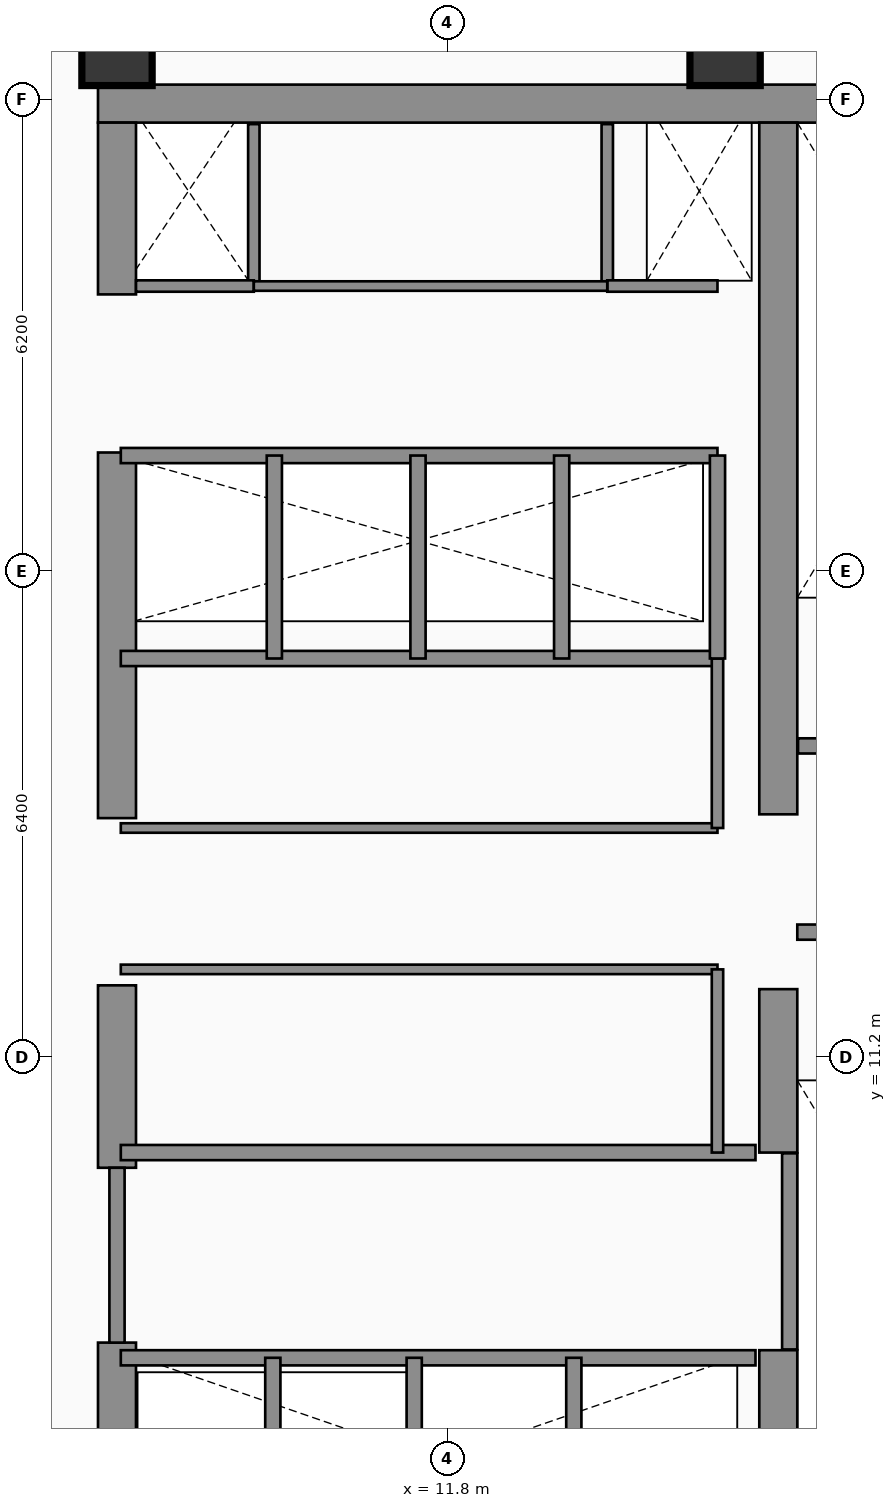
"""IFC4 building model, lengths in metres.
Left out: names, types, materials, properties, quantities, classifications, styles, units other than length and angle.
Written with IfcOpenShell. Run it as: python <this file> out.ifc"""

import sys

from ifc_helpers import new_model, si_unit, direction, frame, frame_2d, origin, origin_2d, place, context, subcontext, project, spatial, rectangle, extrude, element, fill, save


model = new_model("IFC4")
c1 = context("Model", 3, precision=1e-05, world=origin(), true_north=direction((0.0, 1.0)))
c2 = subcontext(c1, "Body", "Model", "MODEL_VIEW")
j1 = project(units=[si_unit("LENGTHUNIT", "METRE"), si_unit("PLANEANGLEUNIT", "RADIAN")], contexts=[c1])
p1 = place(None, origin())
s1 = spatial("IfcSite", under=j1, at=p1, CompositionType="ELEMENT")
p2 = place(p1, origin())
s2 = spatial("IfcBuilding", under=s1, at=p2, CompositionType="ELEMENT")
p3 = place(p2, frame((0.0, 0.0, 344.2)))
s3 = spatial("IfcBuildingStorey", under=s2, at=p3, CompositionType="ELEMENT", Elevation=344.2)
p4 = place(p3, frame((7.2, 23.75, 0.0), z_axis=(0.0, 0.0, 1.0), x_axis=(1.0, 0.0, 0.0)))
e1 = element("IfcWall", 1, at=p4, inside=s3, PredefinedType="SHEAR", context=c2, shape_type="SweptSolid", body=[
    extrude(rectangle(XDim=13.85, YDim=0.5, at=frame_2d((6.925, 0.0))), origin(), (0.0, 0.0, 1.0), 3.66),
])
p5 = place(p3, frame((7.45, 4.65, 0.0), z_axis=(0.0, 0.0, 1.0), x_axis=(0.0, 1.0, 0.0)))
e2 = element("IfcWall", 2, at=p5, inside=s3, PredefinedType="SHEAR", context=c2, shape_type="SweptSolid", body=[
    extrude(rectangle(XDim=2.8, YDim=0.5, at=frame_2d((1.4, 0.0))), origin(), (0.0, 0.0, 1.0), 3.66),
])
p6 = place(p3, frame((7.45, 9.75, 0.0), z_axis=(0.0, 0.0, 1.0), x_axis=(0.0, 1.0, 0.0)))
e3 = element("IfcWall", 3, at=p6, inside=s3, PredefinedType="SHEAR", context=c2, shape_type="SweptSolid", body=[
    extrude(rectangle(XDim=2.4, YDim=0.5, at=frame_2d((1.2, 0.0))), origin(), (0.0, 0.0, 1.0), 3.66),
])
p7 = place(p3, frame((7.45, 14.35, 0.0), z_axis=(0.0, 0.0, 1.0), x_axis=(0.0, 1.0, 0.0)))
e4 = element("IfcWall", 4, at=p7, inside=s3, PredefinedType="SHEAR", context=c2, shape_type="SweptSolid", body=[
    extrude(rectangle(XDim=4.81, YDim=0.5, at=frame_2d((2.405, 0.0))), origin(), (0.0, 0.0, 1.0), 3.66),
])
p8 = place(p3, frame((7.45, 21.24, 0.0), z_axis=(0.0, 0.0, 1.0), x_axis=(0.0, 1.0, 0.0)))
e5 = element("IfcWall", 5, at=p8, inside=s3, PredefinedType="SHEAR", context=c2, shape_type="SweptSolid", body=[
    extrude(rectangle(XDim=2.26, YDim=0.5, at=frame_2d((1.13, 0.0))), origin(), (0.0, 0.0, 1.0), 3.66),
])
p9 = place(p3, frame((16.15, 4.65, 0.0), z_axis=(0.0, 0.0, 1.0), x_axis=(0.0, 1.0, 0.0)))
e6 = element("IfcWall", 6, at=p9, inside=s3, PredefinedType="SHEAR", context=c2, shape_type="SweptSolid", body=[
    extrude(rectangle(XDim=2.7, YDim=0.5, at=frame_2d((1.35, 0.0))), origin(), (0.0, 0.0, 1.0), 3.66),
])
p10 = place(p3, frame((16.15, 9.95, 0.0), z_axis=(0.0, 0.0, 1.0), x_axis=(0.0, 1.0, 0.0)))
e7 = element("IfcWall", 7, at=p10, inside=s3, PredefinedType="SHEAR", context=c2, shape_type="SweptSolid", body=[
    extrude(rectangle(XDim=2.15, YDim=0.5, at=frame_2d((1.075, 0.0))), origin(), (0.0, 0.0, 1.0), 3.66),
])
p11 = place(p3, frame((16.15, 14.4, 0.0), z_axis=(0.0, 0.0, 1.0), x_axis=(0.0, 1.0, 0.0)))
e8 = element("IfcWall", 8, at=p11, inside=s3, PredefinedType="SHEAR", context=c2, shape_type="SweptSolid", body=[
    extrude(rectangle(XDim=9.1, YDim=0.5, at=frame_2d((4.55, 0.0))), origin(), (0.0, 0.0, 1.0), 3.66),
])
for number, where, z_axis, x_axis in (
    (9, (7.45, 24.45, 0.0), (0.0, 0.0, 1.0), (1.0, 0.0, 0.0)),
    (10, (15.45, 24.45, 0.0), (0.0, 0.0, 1.0), (1.0, 0.0, 0.0)),
):
    element("IfcColumn", number, at=place(p3, frame(where, z_axis=z_axis, x_axis=x_axis)), inside=s3, PredefinedType="COLUMN", context=c2, shape_type="SweptSolid", body=[
        extrude(rectangle(XDim=0.9, YDim=0.9, at=origin_2d()), origin(), (0.0, 0.0, 1.0), 3.66),
    ])
p12 = place(p3, frame((16.3, 7.36, 0.0), z_axis=(0.0, 0.0, 1.0), x_axis=(0.0, 1.0, 0.0)))
e11 = element("IfcWall", 11, at=p12, inside=s3, PredefinedType="SHEAR", context=c2, shape_type="SweptSolid", body=[
    extrude(rectangle(XDim=2.58, YDim=0.2, at=frame_2d((1.29, 0.0))), origin(), (0.0, 0.0, 1.0), 3.66),
])
p13 = place(p3, frame((16.4, 12.85, 0.0), z_axis=(0.0, 0.0, 1.0), x_axis=(1.0, 0.0, 0.0)))
e12 = element("IfcWall", 12, at=p13, inside=s3, PredefinedType="PARTITIONING", context=c2, shape_type="SweptSolid", body=[
    extrude(rectangle(XDim=3.96, YDim=0.2, at=frame_2d((1.98, 0.0))), origin(), (0.0, 0.0, 1.0), 3.66),
])
p14 = place(p13, frame((1.304, 0.0, 0.0)))
e13 = element("IfcOpeningElement", 13, at=p14, cuts=e12, PredefinedType="OPENING", context=c2, shape_type="SweptSolid", body=[
    extrude(rectangle(XDim=1.1, YDim=2.2, at=frame_2d((0.55, 1.1))), frame((0.0, 0.11, 0.0), z_axis=(0.0, -1.0, 0.0), x_axis=(1.0, 0.0, 0.0)), (0.0, 0.0, 1.0), 0.22),
])
p15 = place(p3, frame((16.41, 15.3, 0.0), z_axis=(0.0, 0.0, 1.0), x_axis=(1.0, 0.0, 0.0)))
e14 = element("IfcWall", 14, at=p15, inside=s3, PredefinedType="PARTITIONING", context=c2, shape_type="SweptSolid", body=[
    extrude(rectangle(XDim=3.95, YDim=0.2, at=frame_2d((1.975, 0.0))), origin(), (0.0, 0.0, 1.0), 3.66),
])
p16 = place(p15, frame((1.294, 0.0, 0.0)))
e15 = element("IfcOpeningElement", 15, at=p16, cuts=e14, PredefinedType="OPENING", context=c2, shape_type="SweptSolid", body=[
    extrude(rectangle(XDim=1.1, YDim=2.2, at=frame_2d((0.55, 1.1))), frame((0.0, 0.11, 0.0), z_axis=(0.0, -1.0, 0.0), x_axis=(1.0, 0.0, 0.0)), (0.0, 0.0, 1.0), 0.22),
])
p17 = place(p3, frame((7.5, 7.25, 0.0), z_axis=(0.0, 0.0, 1.0), x_axis=(1.0, 0.0, 0.0)))
e16 = element("IfcWall", 16, at=p17, inside=s3, PredefinedType="PARTITIONING", context=c2, shape_type="SweptSolid", body=[
    extrude(rectangle(XDim=8.35, YDim=0.2, at=frame_2d((4.175, 0.0))), origin(), (0.0, 0.0, 1.0), 3.66),
])
p18 = place(p17, frame((0.53, 0.0, 0.0)))
e17 = element("IfcOpeningElement", 17, at=p18, cuts=e16, PredefinedType="OPENING", context=c2, shape_type="SweptSolid", body=[
    extrude(rectangle(XDim=1.1, YDim=2.2, at=frame_2d((0.55, 1.1))), frame((0.0, 0.11, 0.0), z_axis=(0.0, -1.0, 0.0), x_axis=(1.0, 0.0, 0.0)), (0.0, 0.0, 1.0), 0.22),
])
p19 = place(p17, frame((2.37, 0.0, 0.0)))
e18 = element("IfcOpeningElement", 18, at=p19, cuts=e16, PredefinedType="OPENING", context=c2, shape_type="SweptSolid", body=[
    extrude(rectangle(XDim=1.1, YDim=2.2, at=frame_2d((0.55, 1.1))), frame((0.0, 0.11, 0.0), z_axis=(0.0, -1.0, 0.0), x_axis=(1.0, 0.0, 0.0)), (0.0, 0.0, 1.0), 0.22),
])
p20 = place(p17, frame((4.33, 0.0, 0.0)))
e19 = element("IfcOpeningElement", 19, at=p20, cuts=e16, PredefinedType="OPENING", context=c2, shape_type="SweptSolid", body=[
    extrude(rectangle(XDim=1.1, YDim=2.2, at=frame_2d((0.55, 1.1))), frame((0.0, 0.11, 0.0), z_axis=(0.0, -1.0, 0.0), x_axis=(1.0, 0.0, 0.0)), (0.0, 0.0, 1.0), 0.22),
])
p21 = place(p17, frame((6.5, 0.0, 0.0)))
e20 = element("IfcOpeningElement", 20, at=p21, cuts=e16, PredefinedType="OPENING", context=c2, shape_type="SweptSolid", body=[
    extrude(rectangle(XDim=1.1, YDim=2.2, at=frame_2d((0.55, 1.1))), frame((0.0, 0.11, 0.0), z_axis=(0.0, -1.0, 0.0), x_axis=(1.0, 0.0, 0.0)), (0.0, 0.0, 1.0), 0.22),
])
p22 = place(p3, frame((7.5, 9.95, 0.0), z_axis=(0.0, 0.0, 1.0), x_axis=(1.0, 0.0, 0.0)))
e21 = element("IfcWall", 21, at=p22, inside=s3, PredefinedType="PARTITIONING", context=c2, shape_type="SweptSolid", body=[
    extrude(rectangle(XDim=8.35, YDim=0.2, at=frame_2d((4.175, 0.0))), origin(), (0.0, 0.0, 1.0), 3.66),
])
for number, where, z_axis, x_axis in (
    (22, (9.5, 4.45, 0.0), (0.0, 0.0, 1.0), (0.0, 1.0, 0.0)),
    (23, (11.36, 4.45, 0.0), (0.0, 0.0, 1.0), (0.0, 1.0, 0.0)),
    (24, (13.46, 4.45, 0.0), (0.0, 0.0, 1.0), (0.0, 1.0, 0.0)),
):
    element("IfcWall", number, at=place(p3, frame(where, z_axis=z_axis, x_axis=x_axis)), inside=s3, PredefinedType="PARTITIONING", context=c2, shape_type="SweptSolid", body=[
        extrude(rectangle(XDim=2.8, YDim=0.2, at=frame_2d((1.4, 0.0))), origin(), (0.0, 0.0, 1.0), 3.66),
    ])
p23 = place(p3, frame((7.45, 7.45, 0.0), z_axis=(0.0, 0.0, 1.0), x_axis=(0.0, 1.0, 0.0)))
e25 = element("IfcWall", 25, at=p23, inside=s3, PredefinedType="PARTITIONING", context=c2, shape_type="SweptSolid", body=[
    extrude(rectangle(XDim=2.3, YDim=0.2, at=frame_2d((1.15, 0.0))), origin(), (0.0, 0.0, 1.0), 2.64),
])
p24 = place(p23, frame((0.633, 0.0, 0.0)))
e26 = element("IfcOpeningElement", 26, at=p24, cuts=e25, PredefinedType="OPENING", context=c2, shape_type="SweptSolid", body=[
    extrude(rectangle(XDim=1.2, YDim=2.25, at=frame_2d((0.6, 1.125))), frame((0.0, 0.11, 0.0), z_axis=(0.0, -1.0, 0.0), x_axis=(1.0, 0.0, 0.0)), (0.0, 0.0, 1.0), 0.22),
])
p25 = place(p3, frame((7.5, 16.45, 0.0), z_axis=(0.0, 0.0, 1.0), x_axis=(1.0, 0.0, 0.0)))
e27 = element("IfcWall", 27, at=p25, inside=s3, PredefinedType="PARTITIONING", context=c2, shape_type="SweptSolid", body=[
    extrude(rectangle(XDim=7.85, YDim=0.2, at=frame_2d((3.925, 0.0))), origin(), (0.0, 0.0, 1.0), 3.66),
])
p26 = place(p3, frame((7.5, 12.36, 0.0), z_axis=(0.0, 0.0, 1.0), x_axis=(1.0, 0.0, 0.0)))
e28 = element("IfcWall", 28, at=p26, inside=s3, PredefinedType="PARTITIONING", context=c2, shape_type="SweptSolid", body=[
    extrude(rectangle(XDim=7.85, YDim=0.125, at=frame_2d((3.925, 0.0))), origin(), (0.0, 0.0, 1.0), 3.66),
])
p27 = place(p26, frame((3.775, 0.0, 0.0)))
e29 = element("IfcOpeningElement", 29, at=p27, cuts=e28, PredefinedType="OPENING", context=c2, shape_type="SweptSolid", body=[
    extrude(rectangle(XDim=0.95, YDim=2.15, at=frame_2d((0.475, 1.075))), frame((0.0, 0.073, 0.0), z_axis=(0.0, -1.0, 0.0), x_axis=(1.0, 0.0, 0.0)), (0.0, 0.0, 1.0), 0.145),
])
p28 = place(p3, frame((7.5, 14.22, 0.0), z_axis=(0.0, 0.0, 1.0), x_axis=(1.0, 0.0, 0.0)))
e30 = element("IfcWall", 30, at=p28, inside=s3, PredefinedType="PARTITIONING", context=c2, shape_type="SweptSolid", body=[
    extrude(rectangle(XDim=7.85, YDim=0.125, at=frame_2d((3.925, 0.0))), origin(), (0.0, 0.0, 1.0), 3.66),
])
p29 = place(p28, frame((3.775, 0.0, 0.0)))
e31 = element("IfcOpeningElement", 31, at=p29, cuts=e30, PredefinedType="OPENING", context=c2, shape_type="SweptSolid", body=[
    extrude(rectangle(XDim=0.95, YDim=2.15, at=frame_2d((0.475, 1.075))), frame((0.0, 0.073, 0.0), z_axis=(0.0, -1.0, 0.0), x_axis=(1.0, 0.0, 0.0)), (0.0, 0.0, 1.0), 0.145),
])
p30 = place(p3, frame((15.35, 9.95, 0.0), z_axis=(0.0, 0.0, 1.0), x_axis=(0.0, 1.0, 0.0)))
e32 = element("IfcWall", 32, at=p30, inside=s3, PredefinedType="PARTITIONING", context=c2, shape_type="SweptSolid", body=[
    extrude(rectangle(XDim=2.41, YDim=0.15, at=frame_2d((1.205, 0.0))), origin(), (0.0, 0.0, 1.0), 3.66),
])
p31 = place(p3, frame((15.35, 14.22, 0.0), z_axis=(0.0, 0.0, 1.0), x_axis=(0.0, 1.0, 0.0)))
e33 = element("IfcWall", 33, at=p31, inside=s3, PredefinedType="PARTITIONING", context=c2, shape_type="SweptSolid", body=[
    extrude(rectangle(XDim=2.23, YDim=0.15, at=frame_2d((1.115, 0.0))), origin(), (0.0, 0.0, 1.0), 3.66),
])
p32 = place(p3, frame((7.5, 19.12, 0.0), z_axis=(0.0, 0.0, 1.0), x_axis=(1.0, 0.0, 0.0)))
e34 = element("IfcWall", 34, at=p32, inside=s3, PredefinedType="PARTITIONING", context=c2, shape_type="SweptSolid", body=[
    extrude(rectangle(XDim=7.85, YDim=0.2, at=frame_2d((3.925, 0.0))), origin(), (0.0, 0.0, 1.0), 3.66),
])
p33 = place(p32, frame((0.53, 0.0, 0.0)))
e35 = element("IfcOpeningElement", 35, at=p33, cuts=e34, PredefinedType="OPENING", context=c2, shape_type="SweptSolid", body=[
    extrude(rectangle(XDim=1.1, YDim=2.2, at=frame_2d((0.55, 1.1))), frame((0.0, 0.11, 0.0), z_axis=(0.0, -1.0, 0.0), x_axis=(1.0, 0.0, 0.0)), (0.0, 0.0, 1.0), 0.22),
])
p34 = place(p32, frame((2.42, 0.0, 0.0)))
e36 = element("IfcOpeningElement", 36, at=p34, cuts=e34, PredefinedType="OPENING", context=c2, shape_type="SweptSolid", body=[
    extrude(rectangle(XDim=1.1, YDim=2.2, at=frame_2d((0.55, 1.1))), frame((0.0, 0.11, 0.0), z_axis=(0.0, -1.0, 0.0), x_axis=(1.0, 0.0, 0.0)), (0.0, 0.0, 1.0), 0.22),
])
p35 = place(p32, frame((4.31, 0.0, 0.0)))
e37 = element("IfcOpeningElement", 37, at=p35, cuts=e34, PredefinedType="OPENING", context=c2, shape_type="SweptSolid", body=[
    extrude(rectangle(XDim=1.1, YDim=2.2, at=frame_2d((0.55, 1.1))), frame((0.0, 0.11, 0.0), z_axis=(0.0, -1.0, 0.0), x_axis=(1.0, 0.0, 0.0)), (0.0, 0.0, 1.0), 0.22),
])
p36 = place(p32, frame((6.2, 0.0, 0.0)))
e38 = element("IfcOpeningElement", 38, at=p36, cuts=e34, PredefinedType="OPENING", context=c2, shape_type="SweptSolid", body=[
    extrude(rectangle(XDim=1.1, YDim=2.2, at=frame_2d((0.55, 1.1))), frame((0.0, 0.11, 0.0), z_axis=(0.0, -1.0, 0.0), x_axis=(1.0, 0.0, 0.0)), (0.0, 0.0, 1.0), 0.22),
])
for number, where, z_axis, x_axis in (
    (39, (15.35, 16.45, 0.0), (0.0, 0.0, 1.0), (0.0, 1.0, 0.0)),
    (40, (9.52, 16.45, 0.0), (0.0, 0.0, 1.0), (0.0, 1.0, 0.0)),
    (41, (11.41, 16.45, 0.0), (0.0, 0.0, 1.0), (0.0, 1.0, 0.0)),
    (42, (13.3, 16.45, 0.0), (0.0, 0.0, 1.0), (0.0, 1.0, 0.0)),
):
    element("IfcWall", number, at=place(p3, frame(where, z_axis=z_axis, x_axis=x_axis)), inside=s3, PredefinedType="PARTITIONING", context=c2, shape_type="SweptSolid", body=[
        extrude(rectangle(XDim=2.67, YDim=0.2, at=frame_2d((1.335, 0.0))), origin(), (0.0, 0.0, 1.0), 3.66),
    ])
for number, where, z_axis, x_axis in (
    (43, (9.25, 21.35, 0.0), (0.0, 0.0, 1.0), (0.0, 1.0, 0.0)),
    (44, (13.9, 21.35, 0.0), (0.0, 0.0, 1.0), (0.0, 1.0, 0.0)),
):
    element("IfcWall", number, at=place(p3, frame(where, z_axis=z_axis, x_axis=x_axis)), inside=s3, PredefinedType="PARTITIONING", context=c2, shape_type="SweptSolid", body=[
        extrude(rectangle(XDim=2.13, YDim=0.15, at=frame_2d((1.065, 0.0))), origin(), (0.0, 0.0, 1.0), 3.66),
    ])
p37 = place(p3, frame((7.7, 21.35, 0.0), z_axis=(0.0, 0.0, 1.0), x_axis=(1.0, 0.0, 0.0)))
e45 = element("IfcWall", 45, at=p37, inside=s3, PredefinedType="PARTITIONING", context=c2, shape_type="SweptSolid", body=[
    extrude(rectangle(XDim=1.55, YDim=0.15, at=frame_2d((0.775, 0.0))), origin(), (0.0, 0.0, 1.0), 3.66),
])
p38 = place(p37, frame((0.39, 0.0, 0.0)))
e46 = element("IfcOpeningElement", 46, at=p38, cuts=e45, PredefinedType="OPENING", context=c2, shape_type="SweptSolid", body=[
    extrude(rectangle(XDim=0.85, YDim=2.15, at=frame_2d((0.425, 1.075))), frame((0.0, 0.085, 0.0), z_axis=(0.0, -1.0, 0.0), x_axis=(1.0, 0.0, 0.0)), (0.0, 0.0, 1.0), 0.17),
])
p39 = place(p3, frame((13.9, 21.35, 0.0), z_axis=(0.0, 0.0, 1.0), x_axis=(1.0, 0.0, 0.0)))
e47 = element("IfcWall", 47, at=p39, inside=s3, PredefinedType="PARTITIONING", context=c2, shape_type="SweptSolid", body=[
    extrude(rectangle(XDim=1.45, YDim=0.15, at=frame_2d((0.725, 0.0))), origin(), (0.0, 0.0, 1.0), 3.66),
])
p40 = place(p3, frame((9.25, 21.35, 0.0), z_axis=(0.0, 0.0, 1.0), x_axis=(1.0, 0.0, 0.0)))
e48 = element("IfcWall", 48, at=p40, inside=s3, PredefinedType="PARTITIONING", context=c2, shape_type="SweptSolid", body=[
    extrude(rectangle(XDim=4.65, YDim=0.125, at=frame_2d((2.325, 0.0))), origin(), (0.0, 0.0, 1.0), 3.66),
])
p41 = place(p40, frame((1.971, 0.0, 0.0)))
e49 = element("IfcOpeningElement", 49, at=p41, cuts=e48, PredefinedType="OPENING", context=c2, shape_type="SweptSolid", body=[
    extrude(rectangle(XDim=0.85, YDim=2.15, at=frame_2d((0.425, 1.075))), frame((0.0, 0.073, 0.0), z_axis=(0.0, -1.0, 0.0), x_axis=(1.0, 0.0, 0.0)), (0.0, 0.0, 1.0), 0.145),
])
p42 = place(p18, origin())
e50 = element("IfcDoor", 50, at=p42, inside=s3, OperationType="SLIDING_TO_LEFT", PredefinedType="DOOR", context=c2, shape_type="SweptSolid", body=[
    extrude(rectangle(XDim=1.1, YDim=2.2, at=frame_2d((0.55, 1.1))), frame((0.0, 0.025, 0.0), z_axis=(0.0, -1.0, 0.0), x_axis=(1.0, 0.0, 0.0)), (0.0, 0.0, 1.0), 0.05),
])
fill(e17, e50)
p43 = place(p19, origin())
e51 = element("IfcDoor", 51, at=p43, inside=s3, OperationType="SLIDING_TO_LEFT", PredefinedType="DOOR", context=c2, shape_type="SweptSolid", body=[
    extrude(rectangle(XDim=1.1, YDim=2.2, at=frame_2d((0.55, 1.1))), frame((0.0, 0.025, 0.0), z_axis=(0.0, -1.0, 0.0), x_axis=(1.0, 0.0, 0.0)), (0.0, 0.0, 1.0), 0.05),
])
fill(e18, e51)
p44 = place(p20, origin())
e52 = element("IfcDoor", 52, at=p44, inside=s3, OperationType="SLIDING_TO_LEFT", PredefinedType="DOOR", context=c2, shape_type="SweptSolid", body=[
    extrude(rectangle(XDim=1.1, YDim=2.2, at=frame_2d((0.55, 1.1))), frame((0.0, 0.025, 0.0), z_axis=(0.0, -1.0, 0.0), x_axis=(1.0, 0.0, 0.0)), (0.0, 0.0, 1.0), 0.05),
])
fill(e19, e52)
p45 = place(p21, origin())
e53 = element("IfcDoor", 53, at=p45, inside=s3, OperationType="SLIDING_TO_LEFT", PredefinedType="DOOR", context=c2, shape_type="SweptSolid", body=[
    extrude(rectangle(XDim=1.1, YDim=2.2, at=frame_2d((0.55, 1.1))), frame((0.0, 0.025, 0.0), z_axis=(0.0, -1.0, 0.0), x_axis=(1.0, 0.0, 0.0)), (0.0, 0.0, 1.0), 0.05),
])
fill(e20, e53)
p46 = place(p24, frame((1.2, 0.0, 0.0), z_axis=(0.0, 0.0, 1.0), x_axis=(-1.0, 0.0, 0.0)))
e54 = element("IfcDoor", 54, at=p46, inside=s3, OperationType="SINGLE_SWING_LEFT", PredefinedType="DOOR", context=c2, shape_type="SweptSolid", body=[
    extrude(rectangle(XDim=1.2, YDim=2.25, at=frame_2d((0.6, 1.125))), frame((0.0, 0.025, 0.0), z_axis=(0.0, -1.0, 0.0), x_axis=(1.0, 0.0, 0.0)), (0.0, 0.0, 1.0), 0.05),
])
fill(e26, e54)
p47 = place(p27, origin())
e55 = element("IfcDoor", 55, at=p47, inside=s3, OperationType="SINGLE_SWING_RIGHT", PredefinedType="DOOR", context=c2, shape_type="SweptSolid", body=[
    extrude(rectangle(XDim=0.95, YDim=2.15, at=frame_2d((0.475, 1.075))), frame((0.0, 0.025, 0.0), z_axis=(0.0, -1.0, 0.0), x_axis=(1.0, 0.0, 0.0)), (0.0, 0.0, 1.0), 0.05),
])
fill(e29, e55)
p48 = place(p29, origin())
e56 = element("IfcDoor", 56, at=p48, inside=s3, OperationType="SINGLE_SWING_LEFT", PredefinedType="DOOR", context=c2, shape_type="SweptSolid", body=[
    extrude(rectangle(XDim=0.95, YDim=2.15, at=frame_2d((0.475, 1.075))), frame((0.0, 0.025, 0.0), z_axis=(0.0, -1.0, 0.0), x_axis=(1.0, 0.0, 0.0)), (0.0, 0.0, 1.0), 0.05),
])
fill(e31, e56)
p49 = place(p33, origin())
e57 = element("IfcDoor", 57, at=p49, inside=s3, OperationType="SLIDING_TO_LEFT", PredefinedType="DOOR", context=c2, shape_type="SweptSolid", body=[
    extrude(rectangle(XDim=1.1, YDim=2.2, at=frame_2d((0.55, 1.1))), frame((0.0, 0.025, 0.0), z_axis=(0.0, -1.0, 0.0), x_axis=(1.0, 0.0, 0.0)), (0.0, 0.0, 1.0), 0.05),
])
fill(e35, e57)
p50 = place(p34, origin())
e58 = element("IfcDoor", 58, at=p50, inside=s3, OperationType="SLIDING_TO_LEFT", PredefinedType="DOOR", context=c2, shape_type="SweptSolid", body=[
    extrude(rectangle(XDim=1.1, YDim=2.2, at=frame_2d((0.55, 1.1))), frame((0.0, 0.025, 0.0), z_axis=(0.0, -1.0, 0.0), x_axis=(1.0, 0.0, 0.0)), (0.0, 0.0, 1.0), 0.05),
])
fill(e36, e58)
p51 = place(p35, origin())
e59 = element("IfcDoor", 59, at=p51, inside=s3, OperationType="SLIDING_TO_LEFT", PredefinedType="DOOR", context=c2, shape_type="SweptSolid", body=[
    extrude(rectangle(XDim=1.1, YDim=2.2, at=frame_2d((0.55, 1.1))), frame((0.0, 0.025, 0.0), z_axis=(0.0, -1.0, 0.0), x_axis=(1.0, 0.0, 0.0)), (0.0, 0.0, 1.0), 0.05),
])
fill(e37, e59)
p52 = place(p36, origin())
e60 = element("IfcDoor", 60, at=p52, inside=s3, OperationType="SLIDING_TO_LEFT", PredefinedType="DOOR", context=c2, shape_type="SweptSolid", body=[
    extrude(rectangle(XDim=1.1, YDim=2.2, at=frame_2d((0.55, 1.1))), frame((0.0, 0.025, 0.0), z_axis=(0.0, -1.0, 0.0), x_axis=(1.0, 0.0, 0.0)), (0.0, 0.0, 1.0), 0.05),
])
fill(e38, e60)
p53 = place(p38, origin())
e61 = element("IfcDoor", 61, at=p53, inside=s3, OperationType="SINGLE_SWING_RIGHT", PredefinedType="DOOR", context=c2, shape_type="SweptSolid", body=[
    extrude(rectangle(XDim=0.85, YDim=2.15, at=frame_2d((0.425, 1.075))), frame((0.0, 0.025, 0.0), z_axis=(0.0, -1.0, 0.0), x_axis=(1.0, 0.0, 0.0)), (0.0, 0.0, 1.0), 0.05),
])
fill(e46, e61)
p54 = place(p41, origin())
e62 = element("IfcDoor", 62, at=p54, inside=s3, OperationType="SINGLE_SWING_LEFT", PredefinedType="DOOR", context=c2, shape_type="SweptSolid", body=[
    extrude(rectangle(XDim=0.85, YDim=2.15, at=frame_2d((0.425, 1.075))), frame((0.0, 0.025, 0.0), z_axis=(0.0, -1.0, 0.0), x_axis=(1.0, 0.0, 0.0)), (0.0, 0.0, 1.0), 0.05),
])
fill(e49, e62)
save(model, sys.argv[1])
